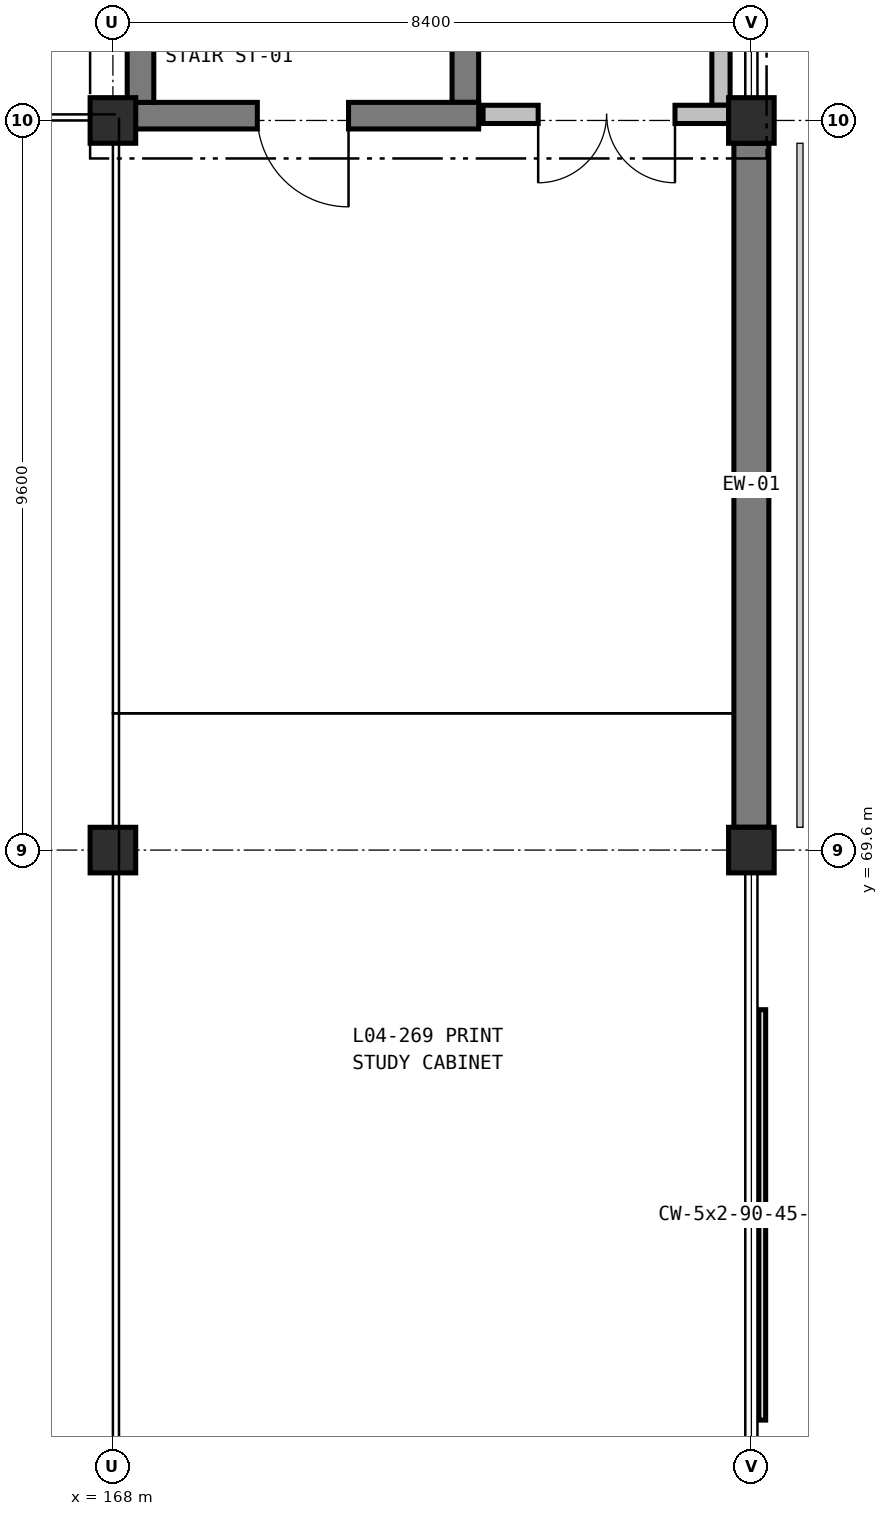
"""IFC4 building model, lengths in metres.
Left out: names, types, materials, properties, quantities, classifications, styles, units other than length and angle.
Written with IfcOpenShell. Run it as: python <this file> out.ifc"""

import sys

from ifc_helpers import new_model, si_unit, direction, frame, frame_2d, origin, origin_2d, place, context, subcontext, project, spatial, rectangle, extrude, element, fill, save


model = new_model("IFC4")
c1 = context("Model", 3, precision=1e-05, world=origin(), true_north=direction((0.0, 1.0)))
c2 = subcontext(c1, "Body", "Model", "MODEL_VIEW")
j1 = project(units=[si_unit("LENGTHUNIT", "METRE"), si_unit("PLANEANGLEUNIT", "RADIAN")], contexts=[c1])
p1 = place(None, origin())
s1 = spatial("IfcSite", under=j1, at=p1, CompositionType="ELEMENT")
p2 = place(p1, origin())
s2 = spatial("IfcBuilding", under=s1, at=p2, CompositionType="ELEMENT")
p3 = place(p2, frame((0.0, 0.0, 22.2)))
s3 = spatial("IfcBuildingStorey", under=s2, at=p3, CompositionType="ELEMENT", Elevation=22.2)
for number, where, z_axis, x_axis in (
    (1, (168.0, 69.6, 0.0), (0.0, 0.0, 1.0), (1.0, 0.0, 0.0)),
    (2, (168.0, 79.2, 0.0), (0.0, 0.0, 1.0), (1.0, 0.0, 0.0)),
    (3, (176.4, 69.6, 0.0), (0.0, 0.0, 1.0), (1.0, 0.0, 0.0)),
    (4, (176.4, 79.2, 0.0), (0.0, 0.0, 1.0), (1.0, 0.0, 0.0)),
):
    element("IfcColumn", number, at=place(p3, frame(where, z_axis=z_axis, x_axis=x_axis)), inside=s3, PredefinedType="COLUMN", context=c2, shape_type="SweptSolid", body=[
        extrude(rectangle(XDim=0.6, YDim=0.6, at=origin_2d()), origin(), (0.0, 0.0, 1.0), 4.8),
    ])
p4 = place(p3, frame((176.4, 78.9, 0.0), z_axis=(0.0, 0.0, 1.0), x_axis=(0.0, -1.0, 0.0)))
e5 = element("IfcWall", 5, at=p4, inside=s3, PredefinedType="SOLIDWALL", context=c2, shape_type="SweptSolid", body=[
    extrude(rectangle(XDim=9.0, YDim=0.46, at=frame_2d((4.5, 0.0))), origin(), (0.0, 0.0, 1.0), 4.5),
])
p5 = place(p3, frame((172.637, 88.562, 0.0), z_axis=(0.0, 0.0, 1.0), x_axis=(0.0, -1.0, 0.0)))
e6 = element("IfcWall", 6, at=p5, inside=s3, PredefinedType="SHEAR", context=c2, shape_type="SweptSolid", body=[
    extrude(rectangle(XDim=9.124, YDim=0.35, at=frame_2d((4.562, 0.0))), origin(), (0.0, 0.0, 1.0), 4.5),
])
p6 = place(p3, frame((172.812, 79.263, 0.0), z_axis=(0.0, 0.0, 1.0), x_axis=(-1.0, 0.0, 0.0)))
e7 = element("IfcWall", 7, at=p6, inside=s3, PredefinedType="SHEAR", context=c2, shape_type="SweptSolid", body=[
    extrude(rectangle(XDim=4.624, YDim=0.35, at=frame_2d((2.312, 0.0))), origin(), (0.0, 0.0, 1.0), 4.5),
])
p7 = place(p6, frame((1.712, 0.0, 0.0)))
e8 = element("IfcOpeningElement", 8, at=p7, cuts=e7, PredefinedType="OPENING", context=c2, shape_type="SweptSolid", body=[
    extrude(rectangle(XDim=1.2, YDim=2.2, at=frame_2d((0.6, 1.1))), frame((0.0, 0.185, 0.0), z_axis=(0.0, -1.0, 0.0), x_axis=(1.0, 0.0, 0.0)), (0.0, 0.0, 1.0), 0.37),
])
p8 = place(p3, frame((168.363, 79.438, 0.0), z_axis=(0.0, 0.0, 1.0), x_axis=(0.0, 1.0, 0.0)))
e9 = element("IfcWall", 9, at=p8, inside=s3, PredefinedType="SHEAR", context=c2, shape_type="SweptSolid", body=[
    extrude(rectangle(XDim=9.124, YDim=0.35, at=frame_2d((4.562, 0.0))), origin(), (0.0, 0.0, 1.0), 4.5),
])
p9 = place(p3, frame((176.0, 84.9, 0.0), z_axis=(0.0, 0.0, 1.0), x_axis=(0.0, -1.0, 0.0)))
e10 = element("IfcWall", 10, at=p9, inside=s3, PredefinedType="PARTITIONING", context=c2, shape_type="SweptSolid", body=[
    extrude(rectangle(XDim=5.5, YDim=0.24, at=frame_2d((2.75, 0.0))), origin(), (0.0, 0.0, 1.0), 3.825),
])
p10 = place(p3, frame((176.12, 79.28, 0.0), z_axis=(0.0, 0.0, 1.0), x_axis=(-1.0, 0.0, 0.0)))
e11 = element("IfcWall", 11, at=p10, inside=s3, PredefinedType="PARTITIONING", context=c2, shape_type="SweptSolid", body=[
    extrude(rectangle(XDim=3.25, YDim=0.24, at=frame_2d((1.625, 0.0))), origin(), (0.0, 0.0, 1.0), 3.825),
])
p11 = place(p10, frame((0.725, 0.0, 0.0)))
e12 = element("IfcOpeningElement", 12, at=p11, cuts=e11, PredefinedType="OPENING", context=c2, shape_type="SweptSolid", body=[
    extrude(rectangle(XDim=1.8, YDim=2.25, at=frame_2d((0.9, 1.125))), frame((0.0, 0.13, 0.0), z_axis=(0.0, -1.0, 0.0), x_axis=(1.0, 0.0, 0.0)), (0.0, 0.0, 1.0), 0.26),
])
p12 = place(p7, origin())
e13 = element("IfcDoor", 13, at=p12, inside=s3, OperationType="SINGLE_SWING_LEFT", PredefinedType="DOOR", context=c2, shape_type="SweptSolid", body=[
    extrude(rectangle(XDim=1.2, YDim=2.2, at=frame_2d((0.6, 1.1))), frame((0.0, 0.025, 0.0), z_axis=(0.0, -1.0, 0.0), x_axis=(1.0, 0.0, 0.0)), (0.0, 0.0, 1.0), 0.05),
])
fill(e8, e13)
p13 = place(p11, origin())
e14 = element("IfcDoor", 14, at=p13, inside=s3, OperationType="DOUBLE_DOOR_SINGLE_SWING", PredefinedType="DOOR", context=c2, shape_type="SweptSolid", body=[
    extrude(rectangle(XDim=1.8, YDim=2.25, at=frame_2d((0.9, 1.125))), frame((0.0, 0.025, 0.0), z_axis=(0.0, -1.0, 0.0), x_axis=(1.0, 0.0, 0.0)), (0.0, 0.0, 1.0), 0.05),
])
fill(e12, e14)
save(model, sys.argv[1])
